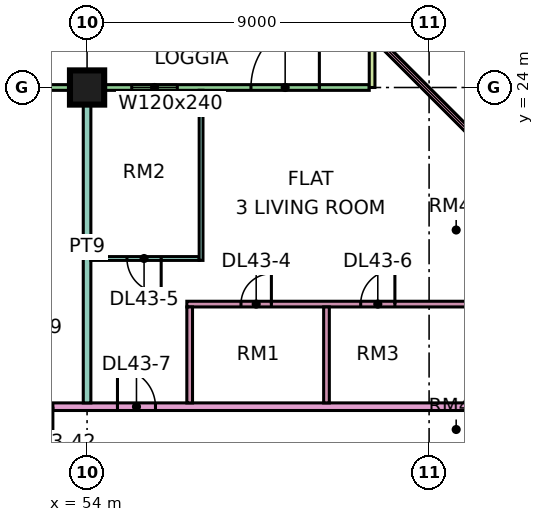
"""IFC4 building model, lengths in metres.
Left out: names, types, materials, properties, quantities, classifications, styles, units other than length and angle.
Written with IfcOpenShell. Run it as: python <this file> out.ifc"""

import sys

from ifc_helpers import new_model, si_unit, direction, frame, frame_2d, origin, origin_2d, place, context, subcontext, project, spatial, rectangle, extrude, element, fill, save


model = new_model("IFC4")
c1 = context("Model", 3, precision=1e-05, world=origin(), true_north=direction((0.0, 1.0)))
c2 = subcontext(c1, "Body", "Model", "MODEL_VIEW")
j1 = project(units=[si_unit("LENGTHUNIT", "METRE"), si_unit("PLANEANGLEUNIT", "RADIAN")], contexts=[c1])
p1 = place(None, origin())
s1 = spatial("IfcSite", under=j1, at=p1, CompositionType="ELEMENT")
p2 = place(p1, origin())
s2 = spatial("IfcBuilding", under=s1, at=p2, CompositionType="ELEMENT")
p3 = place(p2, frame((0.0, 0.0, 187.4)))
s3 = spatial("IfcBuildingStorey", under=s2, at=p3, CompositionType="ELEMENT", Elevation=187.4)
p4 = place(p3, frame((54.0, 24.0, 0.0), z_axis=(0.0, 0.0, 1.0), x_axis=(1.0, 0.0, 0.0)))
e1 = element("IfcColumn", 1, at=p4, inside=s3, PredefinedType="COLUMN", context=c2, shape_type="SweptSolid", body=[
    extrude(rectangle(XDim=0.9, YDim=0.9, at=origin_2d()), origin(), (0.0, 0.0, 1.0), 3.75),
])
p5 = place(p3, frame((61.425, 24.0, 0.0), z_axis=(0.0, 0.0, 1.0), x_axis=(-1.0, 0.0, 0.0)))
e2 = element("IfcWall", 2, at=p5, inside=s3, PredefinedType="SOLIDWALL", context=c2, shape_type="SweptSolid", body=[
    extrude(rectangle(XDim=13.35, YDim=0.15, at=frame_2d((6.675, 0.0))), origin(), (0.0, 0.0, 1.0), 3.35),
])
p6 = place(p5, frame((1.312, 0.0, 0.0)))
e3 = element("IfcOpeningElement", 3, at=p6, cuts=e2, PredefinedType="OPENING", context=c2, shape_type="SweptSolid", body=[
    extrude(rectangle(XDim=1.8, YDim=2.4, at=frame_2d((0.9, 1.2))), frame((0.0, 0.085, 0.0), z_axis=(0.0, -1.0, 0.0), x_axis=(1.0, 0.0, 0.0)), (0.0, 0.0, 1.0), 0.17),
])
p7 = place(p5, frame((5.05, 0.0, 0.45)))
e4 = element("IfcOpeningElement", 4, at=p7, cuts=e2, PredefinedType="OPENING", context=c2, shape_type="SweptSolid", body=[
    extrude(rectangle(XDim=1.2, YDim=2.4, at=frame_2d((0.6, 1.2))), frame((0.0, 0.085, 0.0), z_axis=(0.0, -1.0, 0.0), x_axis=(1.0, 0.0, 0.0)), (0.0, 0.0, 1.0), 0.17),
])
p8 = place(p5, frame((8.562, 0.0, 0.45)))
e5 = element("IfcOpeningElement", 5, at=p8, cuts=e2, PredefinedType="OPENING", context=c2, shape_type="SweptSolid", body=[
    extrude(rectangle(XDim=4.2, YDim=2.4, at=frame_2d((2.1, 1.2))), frame((0.0, 0.085, 0.0), z_axis=(0.0, -1.0, 0.0), x_axis=(1.0, 0.0, 0.0)), (0.0, 0.0, 1.0), 0.17),
])
p9 = place(p3, frame((61.5, 25.5, 0.0), z_axis=(0.0, 0.0, 1.0), x_axis=(0.0, -1.0, 0.0)))
e6 = element("IfcWall", 6, at=p9, inside=s3, PredefinedType="SOLIDWALL", context=c2, shape_type="SweptSolid", body=[
    extrude(rectangle(XDim=1.5, YDim=0.15, at=frame_2d((0.75, 0.0))), origin(), (0.0, 0.0, 1.0), 3.35),
])
p10 = place(p3, frame((64.447, 22.447, 0.0), z_axis=(0.0, 0.0, 1.0), x_axis=(-0.707106781187, 0.707106781187, 0.0)))
e7 = element("IfcWall", 7, at=p10, inside=s3, PredefinedType="SOLIDWALL", context=c2, shape_type="SweptSolid", body=[
    extrude(rectangle(XDim=4.243, YDim=0.15, at=frame_2d((2.121, 0.0))), origin(), (0.0, 0.0, 1.0), 3.35),
])
p11 = place(p10, frame((0.621, 0.0, 0.45)))
e8 = element("IfcOpeningElement", 8, at=p11, cuts=e7, PredefinedType="OPENING", context=c2, shape_type="SweptSolid", body=[
    extrude(rectangle(XDim=3.0, YDim=2.4, at=frame_2d((1.5, 1.2))), frame((0.0, 0.085, 0.0), z_axis=(0.0, -1.0, 0.0), x_axis=(1.0, 0.0, 0.0)), (0.0, 0.0, 1.0), 0.17),
])
p12 = place(p3, frame((51.225, 15.6, 0.0), z_axis=(0.0, 0.0, 1.0), x_axis=(1.0, 0.0, 0.0)))
e9 = element("IfcWall", 9, at=p12, inside=s3, PredefinedType="PARTITIONING", context=c2, shape_type="SweptSolid", body=[
    extrude(rectangle(XDim=13.125, YDim=0.2, at=frame_2d((6.562, 0.0))), origin(), (0.0, 0.0, 1.0), 3.35),
])
p13 = place(p12, frame((3.575, 0.0, 0.0)))
e10 = element("IfcOpeningElement", 10, at=p13, cuts=e9, PredefinedType="OPENING", context=c2, shape_type="SweptSolid", body=[
    extrude(rectangle(XDim=1.0, YDim=2.1, at=frame_2d((0.5, 1.05))), frame((0.0, 0.11, 0.0), z_axis=(0.0, -1.0, 0.0), x_axis=(1.0, 0.0, 0.0)), (0.0, 0.0, 1.0), 0.22),
])
p14 = place(p12, frame((0.875, 0.0, 0.0)))
e11 = element("IfcOpeningElement", 11, at=p14, cuts=e9, PredefinedType="OPENING", context=c2, shape_type="SweptSolid", body=[
    extrude(rectangle(XDim=1.0, YDim=2.1, at=frame_2d((0.5, 1.05))), frame((0.0, 0.11, 0.0), z_axis=(0.0, -1.0, 0.0), x_axis=(1.0, 0.0, 0.0)), (0.0, 0.0, 1.0), 0.22),
])
p15 = place(p3, frame((54.0, 15.7, 0.0), z_axis=(0.0, 0.0, 1.0), x_axis=(0.0, 1.0, 0.0)))
e12 = element("IfcWall", 12, at=p15, inside=s3, PredefinedType="PARTITIONING", context=c2, shape_type="SweptSolid", body=[
    extrude(rectangle(XDim=8.226, YDim=0.2, at=frame_2d((4.113, 0.0))), origin(), (0.0, 0.0, 1.0), 3.35),
])
p16 = place(p3, frame((54.1, 19.5, 0.0), z_axis=(0.0, 0.0, 1.0), x_axis=(1.0, 0.0, 0.0)))
e13 = element("IfcWall", 13, at=p16, inside=s3, PredefinedType="PARTITIONING", context=c2, shape_type="SweptSolid", body=[
    extrude(rectangle(XDim=2.85, YDim=0.1, at=frame_2d((1.425, 0.0))), origin(), (0.0, 0.0, 1.0), 3.35),
])
p17 = place(p16, frame((0.95, 0.0, 0.0)))
e14 = element("IfcOpeningElement", 14, at=p17, cuts=e13, PredefinedType="OPENING", context=c2, shape_type="SweptSolid", body=[
    extrude(rectangle(XDim=0.9, YDim=2.1, at=frame_2d((0.45, 1.05))), frame((0.0, 0.06, 0.0), z_axis=(0.0, -1.0, 0.0), x_axis=(1.0, 0.0, 0.0)), (0.0, 0.0, 1.0), 0.12),
])
p18 = place(p3, frame((56.625, 18.3, 0.0), z_axis=(0.0, 0.0, 1.0), x_axis=(1.0, 0.0, 0.0)))
e15 = element("IfcWall", 15, at=p18, inside=s3, PredefinedType="PARTITIONING", context=c2, shape_type="SweptSolid", body=[
    extrude(rectangle(XDim=7.725, YDim=0.15, at=frame_2d((3.863, 0.0))), origin(), (0.0, 0.0, 1.0), 3.35),
])
p19 = place(p18, frame((1.425, 0.0, 0.0)))
e16 = element("IfcOpeningElement", 16, at=p19, cuts=e15, PredefinedType="OPENING", context=c2, shape_type="SweptSolid", body=[
    extrude(rectangle(XDim=0.8, YDim=2.1, at=frame_2d((0.4, 1.05))), frame((0.0, 0.085, 0.0), z_axis=(0.0, -1.0, 0.0), x_axis=(1.0, 0.0, 0.0)), (0.0, 0.0, 1.0), 0.17),
])
p20 = place(p18, frame((4.575, 0.0, 0.0)))
e17 = element("IfcOpeningElement", 17, at=p20, cuts=e15, PredefinedType="OPENING", context=c2, shape_type="SweptSolid", body=[
    extrude(rectangle(XDim=0.9, YDim=2.1, at=frame_2d((0.45, 1.05))), frame((0.0, 0.085, 0.0), z_axis=(0.0, -1.0, 0.0), x_axis=(1.0, 0.0, 0.0)), (0.0, 0.0, 1.0), 0.17),
])
p21 = place(p3, frame((56.7, 15.7, 0.0), z_axis=(0.0, 0.0, 1.0), x_axis=(0.0, 1.0, 0.0)))
e18 = element("IfcWall", 18, at=p21, inside=s3, PredefinedType="PARTITIONING", context=c2, shape_type="SweptSolid", body=[
    extrude(rectangle(XDim=2.525, YDim=0.15, at=frame_2d((1.263, 0.0))), origin(), (0.0, 0.0, 1.0), 3.35),
])
p22 = place(p3, frame((57.0, 19.45, 0.0), z_axis=(0.0, 0.0, 1.0), x_axis=(0.0, 1.0, 0.0)))
e19 = element("IfcWall", 19, at=p22, inside=s3, PredefinedType="PARTITIONING", context=c2, shape_type="SweptSolid", body=[
    extrude(rectangle(XDim=4.476, YDim=0.1, at=frame_2d((2.238, 0.0))), origin(), (0.0, 0.0, 1.0), 3.35),
])
p23 = place(p3, frame((60.3, 15.7, 0.0), z_axis=(0.0, 0.0, 1.0), x_axis=(0.0, 1.0, 0.0)))
e20 = element("IfcWall", 20, at=p23, inside=s3, PredefinedType="PARTITIONING", context=c2, shape_type="SweptSolid", body=[
    extrude(rectangle(XDim=2.525, YDim=0.15, at=frame_2d((1.263, 0.0))), origin(), (0.0, 0.0, 1.0), 3.35),
])
p24 = place(p6, frame((1.8, 0.0, 0.0), z_axis=(0.0, 0.0, 1.0), x_axis=(-1.0, 0.0, 0.0)))
e21 = element("IfcDoor", 21, at=p24, inside=s3, OperationType="DOUBLE_DOOR_SINGLE_SWING", PredefinedType="DOOR", context=c2, shape_type="SweptSolid", body=[
    extrude(rectangle(XDim=1.8, YDim=2.4, at=frame_2d((0.9, 1.2))), frame((0.0, 0.025, 0.0), z_axis=(0.0, -1.0, 0.0), x_axis=(1.0, 0.0, 0.0)), (0.0, 0.0, 1.0), 0.05),
])
fill(e3, e21)
p25 = place(p7, origin())
e22 = element("IfcWindow", 22, at=p25, inside=s3, PartitioningType="SINGLE_PANEL", PredefinedType="WINDOW", context=c2, shape_type="SweptSolid", body=[
    extrude(rectangle(XDim=1.2, YDim=2.4, at=frame_2d((0.6, 1.2))), frame((0.0, 0.03, 0.0), z_axis=(0.0, -1.0, 0.0), x_axis=(1.0, 0.0, 0.0)), (0.0, 0.0, 1.0), 0.06),
])
fill(e4, e22)
p26 = place(p11, origin())
e23 = element("IfcWindow", 23, at=p26, inside=s3, PartitioningType="SINGLE_PANEL", PredefinedType="WINDOW", context=c2, shape_type="SweptSolid", body=[
    extrude(rectangle(XDim=3.0, YDim=2.4, at=frame_2d((1.5, 1.2))), frame((0.0, 0.03, 0.0), z_axis=(0.0, -1.0, 0.0), x_axis=(1.0, 0.0, 0.0)), (0.0, 0.0, 1.0), 0.06),
])
fill(e8, e23)
p27 = place(p19, frame((0.8, 0.0, 0.0), z_axis=(0.0, 0.0, 1.0), x_axis=(-1.0, 0.0, 0.0)))
e24 = element("IfcDoor", 24, at=p27, inside=s3, OperationType="SINGLE_SWING_RIGHT", PredefinedType="DOOR", context=c2, shape_type="SweptSolid", body=[
    extrude(rectangle(XDim=0.8, YDim=2.1, at=frame_2d((0.4, 1.05))), frame((0.0, 0.025, 0.0), z_axis=(0.0, -1.0, 0.0), x_axis=(1.0, 0.0, 0.0)), (0.0, 0.0, 1.0), 0.05),
])
fill(e16, e24)
p28 = place(p17, origin())
e25 = element("IfcDoor", 25, at=p28, inside=s3, OperationType="SINGLE_SWING_RIGHT", PredefinedType="DOOR", context=c2, shape_type="SweptSolid", body=[
    extrude(rectangle(XDim=0.9, YDim=2.1, at=frame_2d((0.45, 1.05))), frame((0.0, 0.025, 0.0), z_axis=(0.0, -1.0, 0.0), x_axis=(1.0, 0.0, 0.0)), (0.0, 0.0, 1.0), 0.05),
])
fill(e14, e25)
p29 = place(p20, frame((0.9, 0.0, 0.0), z_axis=(0.0, 0.0, 1.0), x_axis=(-1.0, 0.0, 0.0)))
e26 = element("IfcDoor", 26, at=p29, inside=s3, OperationType="SINGLE_SWING_RIGHT", PredefinedType="DOOR", context=c2, shape_type="SweptSolid", body=[
    extrude(rectangle(XDim=0.9, YDim=2.1, at=frame_2d((0.45, 1.05))), frame((0.0, 0.025, 0.0), z_axis=(0.0, -1.0, 0.0), x_axis=(1.0, 0.0, 0.0)), (0.0, 0.0, 1.0), 0.05),
])
fill(e17, e26)
p30 = place(p13, origin())
e27 = element("IfcDoor", 27, at=p30, inside=s3, OperationType="SINGLE_SWING_LEFT", PredefinedType="DOOR", context=c2, shape_type="SweptSolid", body=[
    extrude(rectangle(XDim=1.0, YDim=2.1, at=frame_2d((0.5, 1.05))), frame((0.0, 0.025, 0.0), z_axis=(0.0, -1.0, 0.0), x_axis=(1.0, 0.0, 0.0)), (0.0, 0.0, 1.0), 0.05),
])
fill(e10, e27)
p31 = place(p14, origin())
e28 = element("IfcDoor", 28, at=p31, inside=s3, OperationType="SINGLE_SWING_RIGHT", PredefinedType="DOOR", context=c2, shape_type="SweptSolid", body=[
    extrude(rectangle(XDim=1.0, YDim=2.1, at=frame_2d((0.5, 1.05))), frame((0.0, 0.025, 0.0), z_axis=(0.0, -1.0, 0.0), x_axis=(1.0, 0.0, 0.0)), (0.0, 0.0, 1.0), 0.05),
])
fill(e11, e28)
save(model, sys.argv[1])
